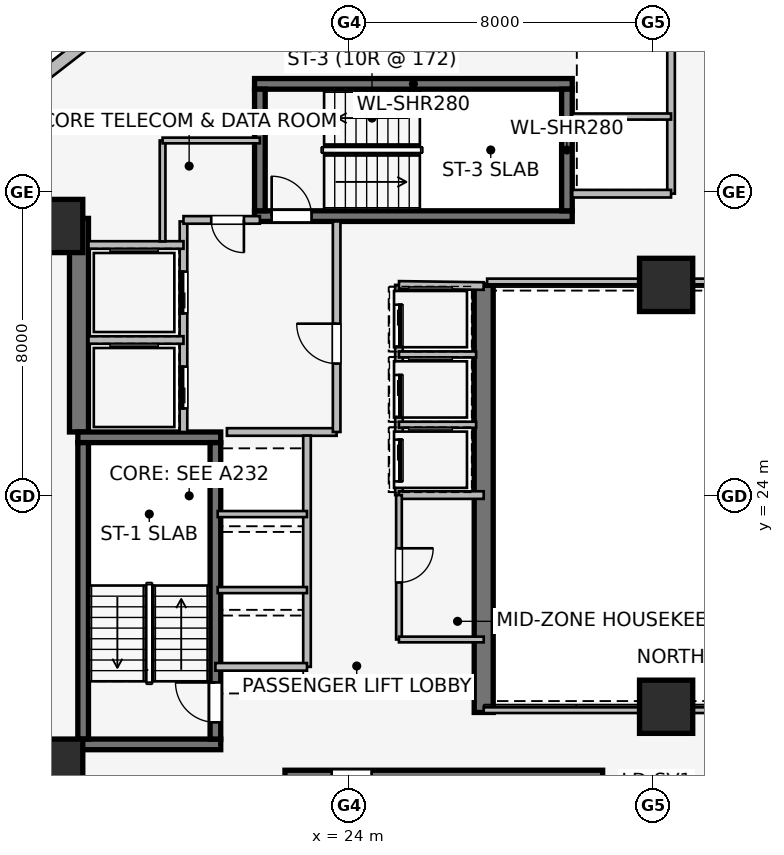
"""IFC4 building model, lengths in metres.
Left out: names, types, materials, properties, quantities, classifications, styles, units other than length and angle.
Written with IfcOpenShell. Run it as: python <this file> out.ifc"""

import sys

from ifc_helpers import new_model, si_unit, direction, frame, frame_2d, origin, origin_2d, place, context, subcontext, project, spatial, rectangle, extrude, element, fill, save


model = new_model("IFC4")
c1 = context("Model", 3, precision=1e-05, world=origin(), true_north=direction((0.0, 1.0)))
c2 = subcontext(c1, "Body", "Model", "MODEL_VIEW")
j1 = project(units=[si_unit("LENGTHUNIT", "METRE"), si_unit("PLANEANGLEUNIT", "RADIAN")], contexts=[c1])
p1 = place(None, origin())
s1 = spatial("IfcSite", under=j1, at=p1, CompositionType="ELEMENT")
p2 = place(p1, origin())
s2 = spatial("IfcBuilding", under=s1, at=p2, CompositionType="ELEMENT")
p3 = place(p2, frame((0.0, 0.0, 115.35)))
s3 = spatial("IfcBuildingStorey", under=s2, at=p3, CompositionType="ELEMENT", Elevation=115.35)
p4 = place(p3, frame((16.9, 25.68, 0.0), z_axis=(0.0, 0.0, 1.0), x_axis=(0.0, 1.0, 0.0)))
e1 = element("IfcWall", 1, at=p4, inside=s3, PredefinedType="SHEAR", context=c2, shape_type="SweptSolid", body=[
    extrude(rectangle(XDim=5.62, YDim=0.5, at=frame_2d((2.81, 0.0))), origin(), (0.0, 0.0, 1.0), 3.45),
])
p5 = place(p3, frame((27.55, 29.55, 0.0), z_axis=(0.0, 0.0, 1.0), x_axis=(0.0, -1.0, 0.0)))
e2 = element("IfcWall", 2, at=p5, inside=s3, PredefinedType="SHEAR", context=c2, shape_type="SweptSolid", body=[
    extrude(rectangle(XDim=11.25, YDim=0.5, at=frame_2d((5.625, 0.0))), origin(), (0.0, 0.0, 1.0), 3.45),
])
for number, where, z_axis, x_axis in (
    (3, (16.87, 17.46, 0.0), (0.0, 0.0, 1.0), (1.0, 0.0, 0.0)),
    (4, (20.63, 25.54, 0.0), (0.0, 0.0, 1.0), (-1.0, 0.0, 0.0)),
):
    element("IfcWall", number, at=place(p3, frame(where, z_axis=z_axis, x_axis=x_axis)), inside=s3, PredefinedType="SHEAR", context=c2, shape_type="SweptSolid", body=[
        extrude(rectangle(XDim=3.76, YDim=0.28, at=frame_2d((1.88, 0.0))), origin(), (0.0, 0.0, 1.0), 3.45),
    ])
p6 = place(p3, frame((17.01, 25.4, 0.0), z_axis=(0.0, 0.0, 1.0), x_axis=(0.0, -1.0, 0.0)))
e5 = element("IfcWall", 5, at=p6, inside=s3, PredefinedType="SHEAR", context=c2, shape_type="SweptSolid", body=[
    extrude(rectangle(XDim=7.8, YDim=0.28, at=frame_2d((3.9, 0.0))), origin(), (0.0, 0.0, 1.0), 3.45),
])
p7 = place(p3, frame((20.49, 17.6, 0.0), z_axis=(0.0, 0.0, 1.0), x_axis=(0.0, 1.0, 0.0)))
e6 = element("IfcWall", 6, at=p7, inside=s3, PredefinedType="SHEAR", context=c2, shape_type="SweptSolid", body=[
    extrude(rectangle(XDim=7.8, YDim=0.28, at=frame_2d((3.9, 0.0))), origin(), (0.0, 0.0, 1.0), 3.45),
])
p8 = place(p7, frame((0.44, 0.0, 0.0)))
e7 = element("IfcOpeningElement", 7, at=p8, cuts=e6, PredefinedType="OPENING", context=c2, shape_type="SweptSolid", body=[
    extrude(rectangle(XDim=1.05, YDim=2.0, at=frame_2d((0.525, 1.0))), frame((0.0, 0.15, 0.0), z_axis=(0.0, -1.0, 0.0), x_axis=(1.0, 0.0, 0.0)), (0.0, 0.0, 1.0), 0.3),
])
p9 = place(p3, frame((30.68, 16.64, 0.0), z_axis=(0.0, 0.0, 1.0), x_axis=(-1.0, 0.0, 0.0)))
e8 = element("IfcWall", 8, at=p9, inside=s3, PredefinedType="SHEAR", context=c2, shape_type="SweptSolid", body=[
    extrude(rectangle(XDim=8.36, YDim=0.28, at=frame_2d((4.18, 0.0))), origin(), (0.0, 0.0, 1.0), 3.45),
])
p10 = place(p9, frame((6.08, 0.0, 0.0)))
e9 = element("IfcOpeningElement", 9, at=p10, cuts=e8, PredefinedType="OPENING", context=c2, shape_type="SweptSolid", body=[
    extrude(rectangle(XDim=1.05, YDim=2.0, at=frame_2d((0.525, 1.0))), frame((0.0, 0.15, 0.0), z_axis=(0.0, -1.0, 0.0), x_axis=(1.0, 0.0, 0.0)), (0.0, 0.0, 1.0), 0.3),
])
p11 = place(p3, frame((21.52, 31.36, 0.0), z_axis=(0.0, 0.0, 1.0), x_axis=(1.0, 0.0, 0.0)))
e10 = element("IfcWall", 10, at=p11, inside=s3, PredefinedType="SHEAR", context=c2, shape_type="SweptSolid", body=[
    extrude(rectangle(XDim=8.36, YDim=0.28, at=frame_2d((4.18, 0.0))), origin(), (0.0, 0.0, 1.0), 3.45),
])
p12 = place(p11, frame((0.45, 0.0, 0.0)))
e11 = element("IfcOpeningElement", 11, at=p12, cuts=e10, PredefinedType="OPENING", context=c2, shape_type="SweptSolid", body=[
    extrude(rectangle(XDim=1.05, YDim=2.0, at=frame_2d((0.525, 1.0))), frame((0.0, 0.15, 0.0), z_axis=(0.0, -1.0, 0.0), x_axis=(1.0, 0.0, 0.0)), (0.0, 0.0, 1.0), 0.3),
])
p13 = place(p3, frame((29.88, 34.84, 0.0), z_axis=(0.0, 0.0, 1.0), x_axis=(-1.0, 0.0, 0.0)))
e12 = element("IfcWall", 12, at=p13, inside=s3, PredefinedType="SHEAR", context=c2, shape_type="SweptSolid", body=[
    extrude(rectangle(XDim=8.36, YDim=0.28, at=frame_2d((4.18, 0.0))), origin(), (0.0, 0.0, 1.0), 3.45),
])
for number, where, z_axis, x_axis in (
    (13, (21.66, 34.7, 0.0), (0.0, 0.0, 1.0), (0.0, -1.0, 0.0)),
    (14, (29.74, 31.5, 0.0), (0.0, 0.0, 1.0), (0.0, 1.0, 0.0)),
):
    element("IfcWall", number, at=place(p3, frame(where, z_axis=z_axis, x_axis=x_axis)), inside=s3, PredefinedType="SHEAR", context=c2, shape_type="SweptSolid", body=[
        extrude(rectangle(XDim=3.2, YDim=0.28, at=frame_2d((1.6, 0.0))), origin(), (0.0, 0.0, 1.0), 3.45),
    ])
for number, where, z_axis, x_axis in (
    (15, (16.3, 16.9, 0.0), (0.0, 0.0, 1.0), (1.0, 0.0, 0.0)),
    (16, (16.3, 31.1, 0.0), (0.0, 0.0, 1.0), (1.0, 0.0, 0.0)),
    (17, (32.35, 18.45, 0.0), (0.0, 0.0, 1.0), (1.0, 0.0, 0.0)),
    (18, (32.35, 29.55, 0.0), (0.0, 0.0, 1.0), (1.0, 0.0, 0.0)),
):
    element("IfcColumn", number, at=place(p3, frame(where, z_axis=z_axis, x_axis=x_axis)), inside=s3, PredefinedType="COLUMN", context=c2, shape_type="SweptSolid", body=[
        extrude(rectangle(XDim=1.4, YDim=1.4, at=origin_2d()), origin(), (0.0, 0.0, 1.0), 3.45),
    ])
p14 = place(p3, frame((15.918, 35.024, 0.0), z_axis=(0.0, 0.0, 1.0), x_axis=(0.790621329885, 0.612305408053, 0.0)))
e19 = element("IfcWall", 19, at=p14, inside=s3, PredefinedType="STANDARD", context=c2, shape_type="SweptSolid", body=[
    extrude(rectangle(XDim=1.676, YDim=0.33, at=frame_2d((0.838, 0.0))), origin(), (0.0, 0.0, 1.0), 3.16),
])
p15 = place(p3, frame((19.65, 25.68, 0.0), z_axis=(0.0, 0.0, 1.0), x_axis=(0.0, 1.0, 0.0)))
e20 = element("IfcWall", 20, at=p15, inside=s3, PredefinedType="PARTITIONING", context=c2, shape_type="SweptSolid", body=[
    extrude(rectangle(XDim=5.54, YDim=0.2, at=frame_2d((2.77, 0.0))), origin(), (0.0, 0.0, 1.0), 3.16),
])
p16 = place(p15, frame((0.62, 0.0, 0.0)))
e21 = element("IfcOpeningElement", 21, at=p16, cuts=e20, PredefinedType="OPENING", context=c2, shape_type="SweptSolid", body=[
    extrude(rectangle(XDim=1.1, YDim=2.2, at=frame_2d((0.55, 1.1))), frame((0.0, 0.11, 0.0), z_axis=(0.0, -1.0, 0.0), x_axis=(1.0, 0.0, 0.0)), (0.0, 0.0, 1.0), 0.22),
])
p17 = place(p15, frame((3.12, 0.0, 0.0)))
e22 = element("IfcOpeningElement", 22, at=p17, cuts=e20, PredefinedType="OPENING", context=c2, shape_type="SweptSolid", body=[
    extrude(rectangle(XDim=1.1, YDim=2.2, at=frame_2d((0.55, 1.1))), frame((0.0, 0.11, 0.0), z_axis=(0.0, -1.0, 0.0), x_axis=(1.0, 0.0, 0.0)), (0.0, 0.0, 1.0), 0.22),
])
p18 = place(p3, frame((20.793, 25.68, 0.0), z_axis=(0.0, 0.0, 1.0), x_axis=(1.0, 0.0, 0.0)))
e23 = element("IfcWall", 23, at=p18, inside=s3, PredefinedType="PARTITIONING", context=c2, shape_type="SweptSolid", body=[
    extrude(rectangle(XDim=2.887, YDim=0.2, at=frame_2d((1.443, 0.0))), origin(), (0.0, 0.0, 1.0), 3.16),
])
p19 = place(p3, frame((23.68, 25.68, 0.0), z_axis=(0.0, 0.0, 1.0), x_axis=(0.0, 1.0, 0.0)))
e24 = element("IfcWall", 24, at=p19, inside=s3, PredefinedType="PARTITIONING", context=c2, shape_type="SweptSolid", body=[
    extrude(rectangle(XDim=5.54, YDim=0.2, at=frame_2d((2.77, 0.0))), origin(), (0.0, 0.0, 1.0), 3.16),
])
p20 = place(p19, frame((1.8, 0.0, 0.0)))
e25 = element("IfcOpeningElement", 25, at=p20, cuts=e24, PredefinedType="OPENING", context=c2, shape_type="SweptSolid", body=[
    extrude(rectangle(XDim=1.05, YDim=2.0, at=frame_2d((0.525, 1.0))), frame((0.0, 0.11, 0.0), z_axis=(0.0, -1.0, 0.0), x_axis=(1.0, 0.0, 0.0)), (0.0, 0.0, 1.0), 0.22),
])
p21 = place(p3, frame((21.66, 31.26, 0.0), z_axis=(0.0, 0.0, 1.0), x_axis=(-1.0, 0.0, 0.0)))
e26 = element("IfcWall", 26, at=p21, inside=s3, PredefinedType="PARTITIONING", context=c2, shape_type="SweptSolid", body=[
    extrude(rectangle(XDim=2.01, YDim=0.2, at=frame_2d((1.005, 0.0))), origin(), (0.0, 0.0, 1.0), 3.16),
])
p22 = place(p21, frame((0.42, 0.0, 0.0)))
e27 = element("IfcOpeningElement", 27, at=p22, cuts=e26, PredefinedType="OPENING", context=c2, shape_type="SweptSolid", body=[
    extrude(rectangle(XDim=0.86, YDim=2.0, at=frame_2d((0.43, 1.0))), frame((0.0, 0.11, 0.0), z_axis=(0.0, -1.0, 0.0), x_axis=(1.0, 0.0, 0.0)), (0.0, 0.0, 1.0), 0.22),
])
p23 = place(p3, frame((17.15, 28.1, 0.0), z_axis=(0.0, 0.0, 1.0), x_axis=(1.0, 0.0, 0.0)))
e28 = element("IfcWall", 28, at=p23, inside=s3, PredefinedType="PARTITIONING", context=c2, shape_type="SweptSolid", body=[
    extrude(rectangle(XDim=2.5, YDim=0.2, at=frame_2d((1.25, 0.0))), origin(), (0.0, 0.0, 1.0), 3.16),
])
p24 = place(p3, frame((19.65, 30.6, 0.0), z_axis=(0.0, 0.0, 1.0), x_axis=(-1.0, 0.0, 0.0)))
e29 = element("IfcWall", 29, at=p24, inside=s3, PredefinedType="PARTITIONING", context=c2, shape_type="SweptSolid", body=[
    extrude(rectangle(XDim=2.5, YDim=0.2, at=frame_2d((1.25, 0.0))), origin(), (0.0, 0.0, 1.0), 2.06),
])
p25 = place(p3, frame((32.48, 31.95, 0.0), z_axis=(0.0, 0.0, 1.0), x_axis=(0.0, 1.0, 0.0)))
e30 = element("IfcWall", 30, at=p25, inside=s3, PredefinedType="PARTITIONING", context=c2, shape_type="SweptSolid", body=[
    extrude(rectangle(XDim=4.05, YDim=0.2, at=frame_2d((2.025, 0.0))), origin(), (0.0, 0.0, 1.0), 3.16),
])
p26 = place(p3, frame((32.48, 31.95, 0.0), z_axis=(0.0, 0.0, 1.0), x_axis=(-1.0, 0.0, 0.0)))
e31 = element("IfcWall", 31, at=p26, inside=s3, PredefinedType="PARTITIONING", context=c2, shape_type="SweptSolid", body=[
    extrude(rectangle(XDim=2.6, YDim=0.2, at=frame_2d((1.3, 0.0))), origin(), (0.0, 0.0, 1.0), 3.16),
])
p27 = place(p3, frame((29.875, 33.98, 0.0), z_axis=(0.0, 0.0, 1.0), x_axis=(1.0, 0.0, 0.0)))
e32 = element("IfcWall", 32, at=p27, inside=s3, PredefinedType="PARTITIONING", context=c2, shape_type="SweptSolid", body=[
    extrude(rectangle(XDim=2.605, YDim=0.16, at=frame_2d((1.302, 0.0))), origin(), (0.0, 0.0, 1.0), 3.16),
])
p28 = place(p3, frame((22.9, 19.5, 0.0), z_axis=(0.0, 0.0, 1.0), x_axis=(0.0, 1.0, 0.0)))
e33 = element("IfcWall", 33, at=p28, inside=s3, PredefinedType="PARTITIONING", context=c2, shape_type="SweptSolid", body=[
    extrude(rectangle(XDim=6.085, YDim=0.2, at=frame_2d((3.042, 0.0))), origin(), (0.0, 0.0, 1.0), 3.16),
])
p29 = place(p3, frame((20.49, 19.5, 0.0), z_axis=(0.0, 0.0, 1.0), x_axis=(1.0, 0.0, 0.0)))
e34 = element("IfcWall", 34, at=p29, inside=s3, PredefinedType="PARTITIONING", context=c2, shape_type="SweptSolid", body=[
    extrude(rectangle(XDim=2.41, YDim=0.2, at=frame_2d((1.205, 0.0))), origin(), (0.0, 0.0, 1.0), 2.06),
])
for number, where, z_axis, x_axis in (
    (35, (20.55, 21.52, 0.0), (0.0, 0.0, 1.0), (1.0, 0.0, 0.0)),
    (36, (20.55, 23.52, 0.0), (0.0, 0.0, 1.0), (1.0, 0.0, 0.0)),
):
    element("IfcWall", number, at=place(p3, frame(where, z_axis=z_axis, x_axis=x_axis)), inside=s3, PredefinedType="PARTITIONING", context=c2, shape_type="SweptSolid", body=[
        extrude(rectangle(XDim=2.35, YDim=0.16, at=frame_2d((1.175, 0.0))), origin(), (0.0, 0.0, 1.0), 3.16),
    ])
p30 = place(p3, frame((25.32, 29.55, 0.0), z_axis=(0.0, 0.0, 1.0), x_axis=(0.0, -1.0, 0.0)))
e37 = element("IfcWall", 37, at=p30, inside=s3, PredefinedType="PARTITIONING", context=c2, shape_type="SweptSolid", body=[
    extrude(rectangle(XDim=5.53, YDim=0.2, at=frame_2d((2.765, 0.0))), origin(), (0.0, 0.0, 1.0), 3.16),
])
p31 = place(p30, frame((0.52, 0.0, 0.0)))
e38 = element("IfcOpeningElement", 38, at=p31, cuts=e37, PredefinedType="OPENING", context=c2, shape_type="SweptSolid", body=[
    extrude(rectangle(XDim=1.1, YDim=2.2, at=frame_2d((0.55, 1.1))), frame((0.0, 0.11, 0.0), z_axis=(0.0, -1.0, 0.0), x_axis=(1.0, 0.0, 0.0)), (0.0, 0.0, 1.0), 0.22),
])
p32 = place(p30, frame((2.37, 0.0, 0.0)))
e39 = element("IfcOpeningElement", 39, at=p32, cuts=e37, PredefinedType="OPENING", context=c2, shape_type="SweptSolid", body=[
    extrude(rectangle(XDim=1.1, YDim=2.2, at=frame_2d((0.55, 1.1))), frame((0.0, 0.11, 0.0), z_axis=(0.0, -1.0, 0.0), x_axis=(1.0, 0.0, 0.0)), (0.0, 0.0, 1.0), 0.22),
])
p33 = place(p30, frame((4.07, 0.0, 0.0)))
e40 = element("IfcOpeningElement", 40, at=p33, cuts=e37, PredefinedType="OPENING", context=c2, shape_type="SweptSolid", body=[
    extrude(rectangle(XDim=1.1, YDim=2.2, at=frame_2d((0.55, 1.1))), frame((0.0, 0.11, 0.0), z_axis=(0.0, -1.0, 0.0), x_axis=(1.0, 0.0, 0.0)), (0.0, 0.0, 1.0), 0.22),
])
p34 = place(p3, frame((27.55, 29.52, 0.0), z_axis=(0.0, 0.0, 1.0), x_axis=(-0.999909343457, 0.013464949556, 0.0)))
e41 = element("IfcWall", 41, at=p34, inside=s3, PredefinedType="PARTITIONING", context=c2, shape_type="SweptSolid", body=[
    extrude(rectangle(XDim=2.23, YDim=0.2, at=frame_2d((1.115, 0.0))), origin(), (0.0, 0.0, 1.0), 2.06),
])
p35 = place(p3, frame((25.32, 24.02, 0.0), z_axis=(0.0, 0.0, 1.0), x_axis=(1.0, 0.0, 0.0)))
e42 = element("IfcWall", 42, at=p35, inside=s3, PredefinedType="PARTITIONING", context=c2, shape_type="SweptSolid", body=[
    extrude(rectangle(XDim=2.23, YDim=0.2, at=frame_2d((1.115, 0.0))), origin(), (0.0, 0.0, 1.0), 3.16),
])
for number, where, z_axis, x_axis in (
    (43, (25.32, 25.87, 0.0), (0.0, 0.0, 1.0), (1.0, 0.0, 0.0)),
    (44, (25.32, 27.72, 0.0), (0.0, 0.0, 1.0), (1.0, 0.0, 0.0)),
):
    element("IfcWall", number, at=place(p3, frame(where, z_axis=z_axis, x_axis=x_axis)), inside=s3, PredefinedType="PARTITIONING", context=c2, shape_type="SweptSolid", body=[
        extrude(rectangle(XDim=2.03, YDim=0.16, at=frame_2d((1.015, 0.0))), origin(), (0.0, 0.0, 1.0), 3.16),
    ])
p36 = place(p3, frame((25.32, 24.02, 0.0), z_axis=(0.0, 0.0, 1.0), x_axis=(0.0, -1.0, 0.0)))
e45 = element("IfcWall", 45, at=p36, inside=s3, PredefinedType="PARTITIONING", context=c2, shape_type="SweptSolid", body=[
    extrude(rectangle(XDim=3.8, YDim=0.15, at=frame_2d((1.9, 0.0))), origin(), (0.0, 0.0, 1.0), 3.16),
])
p37 = place(p36, frame((1.4, 0.0, 0.0)))
e46 = element("IfcOpeningElement", 46, at=p37, cuts=e45, PredefinedType="OPENING", context=c2, shape_type="SweptSolid", body=[
    extrude(rectangle(XDim=0.9, YDim=2.0, at=frame_2d((0.45, 1.0))), frame((0.0, 0.085, 0.0), z_axis=(0.0, -1.0, 0.0), x_axis=(1.0, 0.0, 0.0)), (0.0, 0.0, 1.0), 0.17),
])
p38 = place(p3, frame((25.32, 20.22, 0.0), z_axis=(0.0, 0.0, 1.0), x_axis=(1.0, 0.0, 0.0)))
e47 = element("IfcWall", 47, at=p38, inside=s3, PredefinedType="PARTITIONING", context=c2, shape_type="SweptSolid", body=[
    extrude(rectangle(XDim=2.23, YDim=0.15, at=frame_2d((1.115, 0.0))), origin(), (0.0, 0.0, 1.0), 3.16),
])
p39 = place(p3, frame((19.1, 33.35, 0.0), z_axis=(0.0, 0.0, 1.0), x_axis=(0.0, -1.0, 0.0)))
e48 = element("IfcWall", 48, at=p39, inside=s3, PredefinedType="PARTITIONING", context=c2, shape_type="SweptSolid", body=[
    extrude(rectangle(XDim=2.655, YDim=0.15, at=frame_2d((1.328, 0.0))), origin(), (0.0, 0.0, 1.0), 2.39),
])
p40 = place(p3, frame((21.66, 33.35, 0.0), z_axis=(0.0, 0.0, 1.0), x_axis=(-1.0, 0.0, 0.0)))
e49 = element("IfcWall", 49, at=p40, inside=s3, PredefinedType="PARTITIONING", context=c2, shape_type="SweptSolid", body=[
    extrude(rectangle(XDim=2.56, YDim=0.15, at=frame_2d((1.28, 0.0))), origin(), (0.0, 0.0, 1.0), 3.16),
])
p41 = place(p3, frame((27.55, 18.36, 0.0), z_axis=(0.0, 0.0, 1.0), x_axis=(1.0, 0.0, 0.0)))
e50 = element("IfcWall", 50, at=p41, inside=s3, PredefinedType="PARTITIONING", context=c2, shape_type="SweptSolid", body=[
    extrude(rectangle(XDim=12.29, YDim=0.15, at=frame_2d((6.145, 0.0))), origin(), (0.0, 0.0, 1.0), 2.301),
])
p42 = place(p3, frame((39.84, 29.64, 0.0), z_axis=(0.0, 0.0, 1.0), x_axis=(-1.0, 0.0, 0.0)))
e51 = element("IfcWall", 51, at=p42, inside=s3, PredefinedType="PARTITIONING", context=c2, shape_type="SweptSolid", body=[
    extrude(rectangle(XDim=12.2, YDim=0.15, at=frame_2d((6.1, 0.0))), origin(), (0.0, 0.0, 1.0), 2.301),
])
p43 = place(p8, origin())
e52 = element("IfcDoor", 52, at=p43, inside=s3, OperationType="SINGLE_SWING_RIGHT", PredefinedType="DOOR", context=c2, shape_type="SweptSolid", body=[
    extrude(rectangle(XDim=1.05, YDim=2.0, at=frame_2d((0.525, 1.0))), frame((0.0, 0.025, 0.0), z_axis=(0.0, -1.0, 0.0), x_axis=(1.0, 0.0, 0.0)), (0.0, 0.0, 1.0), 0.05),
])
fill(e7, e52)
p44 = place(p10, origin())
e53 = element("IfcDoor", 53, at=p44, inside=s3, OperationType="SINGLE_SWING_RIGHT", PredefinedType="DOOR", context=c2, shape_type="SweptSolid", body=[
    extrude(rectangle(XDim=1.05, YDim=2.0, at=frame_2d((0.525, 1.0))), frame((0.0, 0.025, 0.0), z_axis=(0.0, -1.0, 0.0), x_axis=(1.0, 0.0, 0.0)), (0.0, 0.0, 1.0), 0.05),
])
fill(e9, e53)
p45 = place(p12, origin())
e54 = element("IfcDoor", 54, at=p45, inside=s3, OperationType="SINGLE_SWING_LEFT", PredefinedType="DOOR", context=c2, shape_type="SweptSolid", body=[
    extrude(rectangle(XDim=1.05, YDim=2.0, at=frame_2d((0.525, 1.0))), frame((0.0, 0.025, 0.0), z_axis=(0.0, -1.0, 0.0), x_axis=(1.0, 0.0, 0.0)), (0.0, 0.0, 1.0), 0.05),
])
fill(e11, e54)
p46 = place(p16, origin())
e55 = element("IfcDoor", 55, at=p46, inside=s3, OperationType="SLIDING_TO_LEFT", PredefinedType="DOOR", context=c2, shape_type="SweptSolid", body=[
    extrude(rectangle(XDim=1.1, YDim=2.2, at=frame_2d((0.55, 1.1))), frame((0.0, 0.025, 0.0), z_axis=(0.0, -1.0, 0.0), x_axis=(1.0, 0.0, 0.0)), (0.0, 0.0, 1.0), 0.05),
])
fill(e21, e55)
p47 = place(p17, origin())
e56 = element("IfcDoor", 56, at=p47, inside=s3, OperationType="SLIDING_TO_LEFT", PredefinedType="DOOR", context=c2, shape_type="SweptSolid", body=[
    extrude(rectangle(XDim=1.1, YDim=2.2, at=frame_2d((0.55, 1.1))), frame((0.0, 0.025, 0.0), z_axis=(0.0, -1.0, 0.0), x_axis=(1.0, 0.0, 0.0)), (0.0, 0.0, 1.0), 0.05),
])
fill(e22, e56)
p48 = place(p20, origin())
e57 = element("IfcDoor", 57, at=p48, inside=s3, OperationType="SINGLE_SWING_RIGHT", PredefinedType="DOOR", context=c2, shape_type="SweptSolid", body=[
    extrude(rectangle(XDim=1.05, YDim=2.0, at=frame_2d((0.525, 1.0))), frame((0.0, 0.025, 0.0), z_axis=(0.0, -1.0, 0.0), x_axis=(1.0, 0.0, 0.0)), (0.0, 0.0, 1.0), 0.05),
])
fill(e25, e57)
p49 = place(p22, origin())
e58 = element("IfcDoor", 58, at=p49, inside=s3, OperationType="SINGLE_SWING_LEFT", PredefinedType="DOOR", context=c2, shape_type="SweptSolid", body=[
    extrude(rectangle(XDim=0.86, YDim=2.0, at=frame_2d((0.43, 1.0))), frame((0.0, 0.025, 0.0), z_axis=(0.0, -1.0, 0.0), x_axis=(1.0, 0.0, 0.0)), (0.0, 0.0, 1.0), 0.05),
])
fill(e27, e58)
p50 = place(p31, origin())
e59 = element("IfcDoor", 59, at=p50, inside=s3, OperationType="SLIDING_TO_LEFT", PredefinedType="DOOR", context=c2, shape_type="SweptSolid", body=[
    extrude(rectangle(XDim=1.1, YDim=2.2, at=frame_2d((0.55, 1.1))), frame((0.0, 0.025, 0.0), z_axis=(0.0, -1.0, 0.0), x_axis=(1.0, 0.0, 0.0)), (0.0, 0.0, 1.0), 0.05),
])
fill(e38, e59)
p51 = place(p32, origin())
e60 = element("IfcDoor", 60, at=p51, inside=s3, OperationType="SLIDING_TO_LEFT", PredefinedType="DOOR", context=c2, shape_type="SweptSolid", body=[
    extrude(rectangle(XDim=1.1, YDim=2.2, at=frame_2d((0.55, 1.1))), frame((0.0, 0.025, 0.0), z_axis=(0.0, -1.0, 0.0), x_axis=(1.0, 0.0, 0.0)), (0.0, 0.0, 1.0), 0.05),
])
fill(e39, e60)
p52 = place(p33, origin())
e61 = element("IfcDoor", 61, at=p52, inside=s3, OperationType="SLIDING_TO_LEFT", PredefinedType="DOOR", context=c2, shape_type="SweptSolid", body=[
    extrude(rectangle(XDim=1.1, YDim=2.2, at=frame_2d((0.55, 1.1))), frame((0.0, 0.025, 0.0), z_axis=(0.0, -1.0, 0.0), x_axis=(1.0, 0.0, 0.0)), (0.0, 0.0, 1.0), 0.05),
])
fill(e40, e61)
p53 = place(p37, origin())
e62 = element("IfcDoor", 62, at=p53, inside=s3, OperationType="SINGLE_SWING_LEFT", PredefinedType="DOOR", context=c2, shape_type="SweptSolid", body=[
    extrude(rectangle(XDim=0.9, YDim=2.0, at=frame_2d((0.45, 1.0))), frame((0.0, 0.025, 0.0), z_axis=(0.0, -1.0, 0.0), x_axis=(1.0, 0.0, 0.0)), (0.0, 0.0, 1.0), 0.05),
])
fill(e46, e62)
save(model, sys.argv[1])
